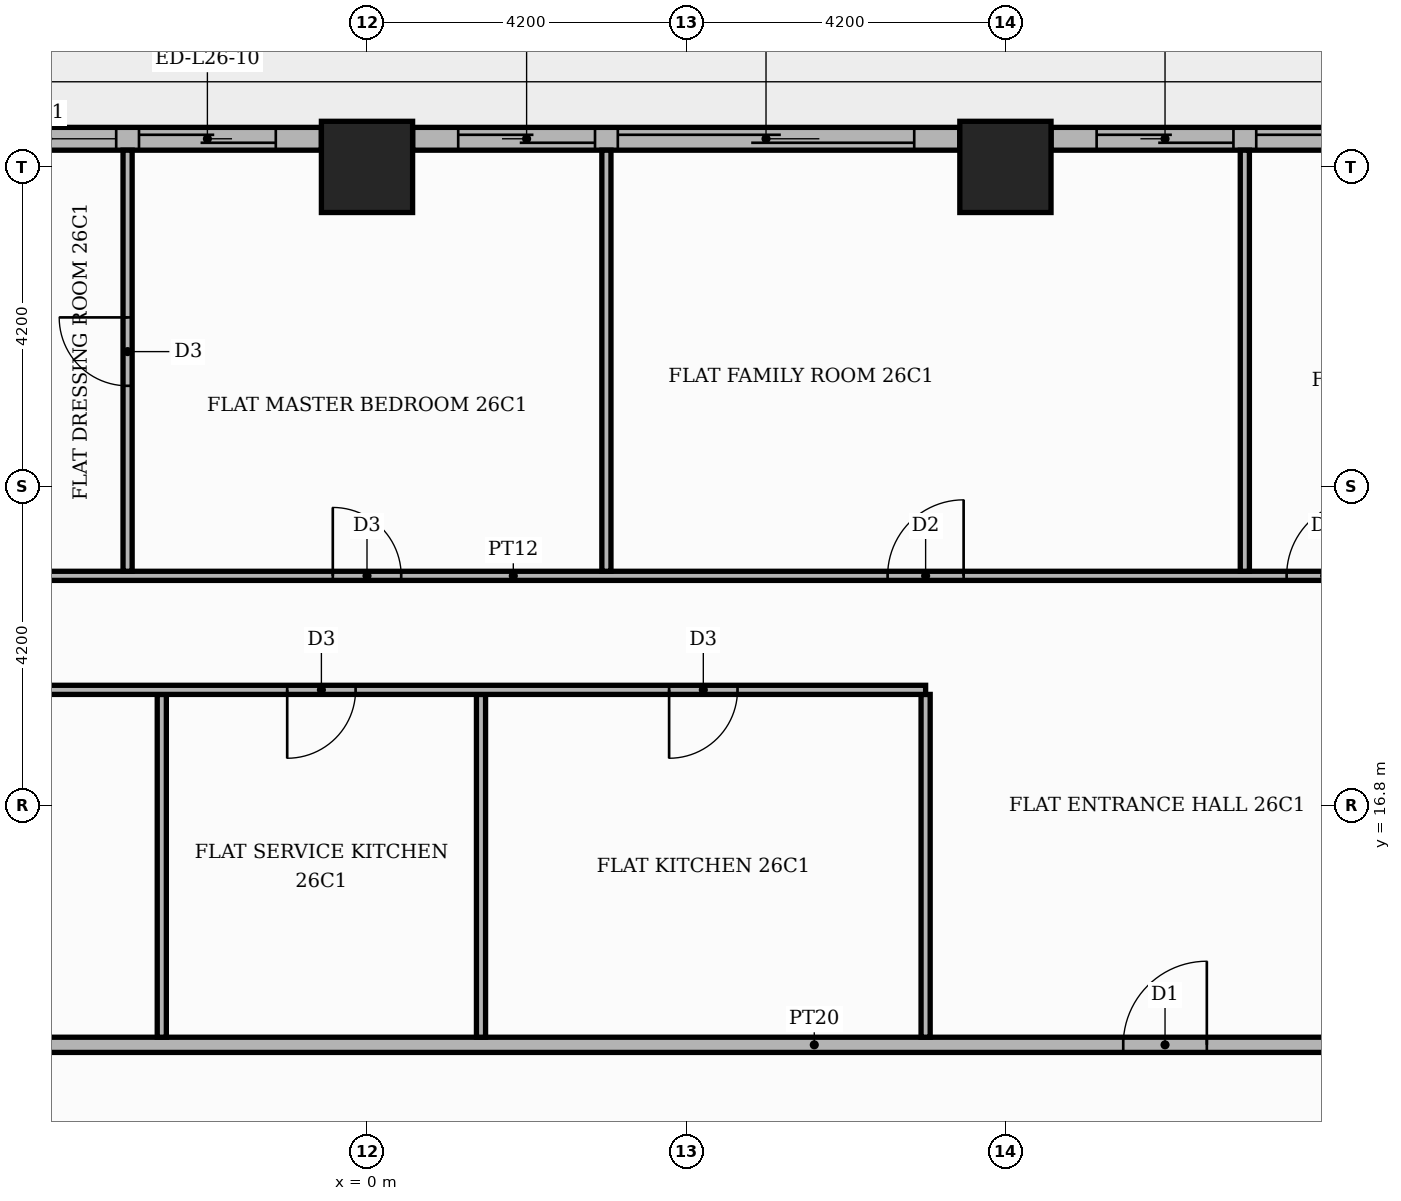
"""IFC4 building model, lengths in metres.
Left out: names, types, materials, properties, quantities, classifications, styles, units other than length and angle.
Written with IfcOpenShell. Run it as: python <this file> out.ifc"""

import sys

from ifc_helpers import new_model, si_unit, direction, frame, frame_2d, origin, origin_2d, place, context, subcontext, project, spatial, rectangle, extrude, element, fill, save


model = new_model("IFC4")
c1 = context("Model", 3, precision=1e-05, world=origin(), true_north=direction((0.0, 1.0)))
c2 = subcontext(c1, "Body", "Model", "MODEL_VIEW")
j1 = project(units=[si_unit("LENGTHUNIT", "METRE"), si_unit("PLANEANGLEUNIT", "RADIAN")], contexts=[c1])
p1 = place(None, origin())
s1 = spatial("IfcSite", under=j1, at=p1, CompositionType="ELEMENT")
p2 = place(p1, origin())
s2 = spatial("IfcBuilding", under=s1, at=p2, CompositionType="ELEMENT")
p3 = place(p2, frame((0.0, 0.0, 110.4)))
s3 = spatial("IfcBuildingStorey", under=s2, at=p3, CompositionType="ELEMENT", Elevation=110.4)
for number, where, z_axis, x_axis in (
    (1, (0.0, 25.2, 0.0), (0.0, 0.0, 1.0), (1.0, 0.0, 0.0)),
    (2, (8.4, 25.2, 0.0), (0.0, 0.0, 1.0), (1.0, 0.0, 0.0)),
):
    element("IfcColumn", number, at=place(p3, frame(where, z_axis=z_axis, x_axis=x_axis)), inside=s3, PredefinedType="COLUMN", context=c2, shape_type="SweptSolid", body=[
        extrude(rectangle(XDim=1.2, YDim=1.2, at=origin_2d()), origin(), (0.0, 0.0, 1.0), 3.9),
    ])
p4 = place(p3, frame((16.2, 25.57, 0.0), z_axis=(0.0, 0.0, 1.0), x_axis=(-1.0, 0.0, 0.0)))
e3 = element("IfcWall", 3, at=p4, inside=s3, PredefinedType="STANDARD", context=c2, shape_type="SweptSolid", body=[
    extrude(rectangle(XDim=7.2, YDim=0.3, at=frame_2d((3.6, 0.0))), origin(), (0.0, 0.0, 1.0), 3.48),
])
p5 = place(p4, frame((0.6, 0.0, 0.0)))
e4 = element("IfcOpeningElement", 4, at=p5, cuts=e3, PredefinedType="OPENING", context=c2, shape_type="SweptSolid", body=[
    extrude(rectangle(XDim=3.9, YDim=2.4, at=frame_2d((1.95, 1.2))), frame((0.0, 0.16, 0.0), z_axis=(0.0, -1.0, 0.0), x_axis=(1.0, 0.0, 0.0)), (0.0, 0.0, 1.0), 0.32),
])
p6 = place(p4, frame((4.8, 0.0, 0.0)))
e5 = element("IfcOpeningElement", 5, at=p6, cuts=e3, PredefinedType="OPENING", context=c2, shape_type="SweptSolid", body=[
    extrude(rectangle(XDim=1.8, YDim=2.4, at=frame_2d((0.9, 1.2))), frame((0.0, 0.16, 0.0), z_axis=(0.0, -1.0, 0.0), x_axis=(1.0, 0.0, 0.0)), (0.0, 0.0, 1.0), 0.32),
])
p7 = place(p3, frame((7.8, 25.57, 0.0), z_axis=(0.0, 0.0, 1.0), x_axis=(-1.0, 0.0, 0.0)))
e6 = element("IfcWall", 6, at=p7, inside=s3, PredefinedType="STANDARD", context=c2, shape_type="SweptSolid", body=[
    extrude(rectangle(XDim=7.2, YDim=0.3, at=frame_2d((3.6, 0.0))), origin(), (0.0, 0.0, 1.0), 3.48),
])
p8 = place(p7, frame((0.6, 0.0, 0.0)))
e7 = element("IfcOpeningElement", 7, at=p8, cuts=e6, PredefinedType="OPENING", context=c2, shape_type="SweptSolid", body=[
    extrude(rectangle(XDim=3.9, YDim=2.4, at=frame_2d((1.95, 1.2))), frame((0.0, 0.16, 0.0), z_axis=(0.0, -1.0, 0.0), x_axis=(1.0, 0.0, 0.0)), (0.0, 0.0, 1.0), 0.32),
])
p9 = place(p7, frame((4.8, 0.0, 0.0)))
e8 = element("IfcOpeningElement", 8, at=p9, cuts=e6, PredefinedType="OPENING", context=c2, shape_type="SweptSolid", body=[
    extrude(rectangle(XDim=1.8, YDim=2.4, at=frame_2d((0.9, 1.2))), frame((0.0, 0.16, 0.0), z_axis=(0.0, -1.0, 0.0), x_axis=(1.0, 0.0, 0.0)), (0.0, 0.0, 1.0), 0.32),
])
p10 = place(p3, frame((-0.6, 25.57, 0.0), z_axis=(0.0, 0.0, 1.0), x_axis=(-1.0, 0.0, 0.0)))
e9 = element("IfcWall", 9, at=p10, inside=s3, PredefinedType="STANDARD", context=c2, shape_type="SweptSolid", body=[
    extrude(rectangle(XDim=7.2, YDim=0.3, at=frame_2d((3.6, 0.0))), origin(), (0.0, 0.0, 1.0), 3.48),
])
p11 = place(p10, frame((0.6, 0.0, 0.0)))
e10 = element("IfcOpeningElement", 10, at=p11, cuts=e9, PredefinedType="OPENING", context=c2, shape_type="SweptSolid", body=[
    extrude(rectangle(XDim=1.8, YDim=2.4, at=frame_2d((0.9, 1.2))), frame((0.0, 0.16, 0.0), z_axis=(0.0, -1.0, 0.0), x_axis=(1.0, 0.0, 0.0)), (0.0, 0.0, 1.0), 0.32),
])
p12 = place(p10, frame((2.7, 0.0, 0.9)))
e11 = element("IfcOpeningElement", 11, at=p12, cuts=e9, PredefinedType="OPENING", context=c2, shape_type="SweptSolid", body=[
    extrude(rectangle(XDim=1.8, YDim=2.1, at=frame_2d((0.9, 1.05))), frame((0.0, 0.16, 0.0), z_axis=(0.0, -1.0, 0.0), x_axis=(1.0, 0.0, 0.0)), (0.0, 0.0, 1.0), 0.32),
])
p13 = place(p10, frame((4.8, 0.0, 0.9)))
e12 = element("IfcOpeningElement", 12, at=p13, cuts=e9, PredefinedType="OPENING", context=c2, shape_type="SweptSolid", body=[
    extrude(rectangle(XDim=1.8, YDim=2.1, at=frame_2d((0.9, 1.05))), frame((0.0, 0.16, 0.0), z_axis=(0.0, -1.0, 0.0), x_axis=(1.0, 0.0, 0.0)), (0.0, 0.0, 1.0), 0.32),
])
p14 = place(p3, frame((-13.65, 13.65, 0.0), z_axis=(0.0, 0.0, 1.0), x_axis=(1.0, 0.0, 0.0)))
e13 = element("IfcWall", 13, at=p14, inside=s3, PredefinedType="PARTITIONING", context=c2, shape_type="SweptSolid", body=[
    extrude(rectangle(XDim=39.07, YDim=0.2, at=frame_2d((19.535, 0.0))), origin(), (0.0, 0.0, 1.0), 3.48),
])
p15 = place(p14, frame((23.6, 0.0, 0.0)))
e14 = element("IfcOpeningElement", 14, at=p15, cuts=e13, PredefinedType="OPENING", context=c2, shape_type="SweptSolid", body=[
    extrude(rectangle(XDim=1.1, YDim=2.4, at=frame_2d((0.55, 1.2))), frame((0.0, 0.11, 0.0), z_axis=(0.0, -1.0, 0.0), x_axis=(1.0, 0.0, 0.0)), (0.0, 0.0, 1.0), 0.22),
])
for number, where, z_axis, x_axis in (
    (15, (-2.7, 13.75, 0.0), (0.0, 0.0, 1.0), (0.0, 1.0, 0.0)),
    (16, (1.5, 13.75, 0.0), (0.0, 0.0, 1.0), (0.0, 1.0, 0.0)),
    (17, (7.35, 13.75, 0.0), (0.0, 0.0, 1.0), (0.0, 1.0, 0.0)),
):
    element("IfcWall", number, at=place(p3, frame(where, z_axis=z_axis, x_axis=x_axis)), inside=s3, PredefinedType="PARTITIONING", context=c2, shape_type="SweptSolid", body=[
        extrude(rectangle(XDim=4.51, YDim=0.12, at=frame_2d((2.255, 0.0))), origin(), (0.0, 0.0, 1.0), 3.48),
    ])
p16 = place(p3, frame((-13.55, 18.32, 0.0), z_axis=(0.0, 0.0, 1.0), x_axis=(1.0, 0.0, 0.0)))
e18 = element("IfcWall", 18, at=p16, inside=s3, PredefinedType="PARTITIONING", context=c2, shape_type="SweptSolid", body=[
    extrude(rectangle(XDim=20.9, YDim=0.12, at=frame_2d((10.45, 0.0))), origin(), (0.0, 0.0, 1.0), 3.48),
])
p17 = place(p16, frame((17.525, 0.0, 0.0)))
e19 = element("IfcOpeningElement", 19, at=p17, cuts=e18, PredefinedType="OPENING", context=c2, shape_type="SweptSolid", body=[
    extrude(rectangle(XDim=0.9, YDim=2.1, at=frame_2d((0.45, 1.05))), frame((0.0, 0.07, 0.0), z_axis=(0.0, -1.0, 0.0), x_axis=(1.0, 0.0, 0.0)), (0.0, 0.0, 1.0), 0.14),
])
p18 = place(p16, frame((12.5, 0.0, 0.0)))
e20 = element("IfcOpeningElement", 20, at=p18, cuts=e18, PredefinedType="OPENING", context=c2, shape_type="SweptSolid", body=[
    extrude(rectangle(XDim=0.9, YDim=2.1, at=frame_2d((0.45, 1.05))), frame((0.0, 0.07, 0.0), z_axis=(0.0, -1.0, 0.0), x_axis=(1.0, 0.0, 0.0)), (0.0, 0.0, 1.0), 0.14),
])
p19 = place(p16, frame((7.025, 0.0, 0.0)))
e21 = element("IfcOpeningElement", 21, at=p19, cuts=e18, PredefinedType="OPENING", context=c2, shape_type="SweptSolid", body=[
    extrude(rectangle(XDim=0.9, YDim=2.1, at=frame_2d((0.45, 1.05))), frame((0.0, 0.07, 0.0), z_axis=(0.0, -1.0, 0.0), x_axis=(1.0, 0.0, 0.0)), (0.0, 0.0, 1.0), 0.14),
])
p20 = place(p16, frame((2.75, 0.0, 0.0)))
e22 = element("IfcOpeningElement", 22, at=p20, cuts=e18, PredefinedType="OPENING", context=c2, shape_type="SweptSolid", body=[
    extrude(rectangle(XDim=0.9, YDim=2.1, at=frame_2d((0.45, 1.05))), frame((0.0, 0.07, 0.0), z_axis=(0.0, -1.0, 0.0), x_axis=(1.0, 0.0, 0.0)), (0.0, 0.0, 1.0), 0.14),
])
p21 = place(p16, frame((0.65, 0.0, 0.0)))
e23 = element("IfcOpeningElement", 23, at=p21, cuts=e18, PredefinedType="OPENING", context=c2, shape_type="SweptSolid", body=[
    extrude(rectangle(XDim=0.9, YDim=2.1, at=frame_2d((0.45, 1.05))), frame((0.0, 0.07, 0.0), z_axis=(0.0, -1.0, 0.0), x_axis=(1.0, 0.0, 0.0)), (0.0, 0.0, 1.0), 0.14),
])
p22 = place(p3, frame((-13.55, 19.82, 0.0), z_axis=(0.0, 0.0, 1.0), x_axis=(1.0, 0.0, 0.0)))
e24 = element("IfcWall", 24, at=p22, inside=s3, PredefinedType="PARTITIONING", context=c2, shape_type="SweptSolid", body=[
    extrude(rectangle(XDim=30.95, YDim=0.12, at=frame_2d((15.475, 0.0))), origin(), (0.0, 0.0, 1.0), 3.48),
])
p23 = place(p22, frame((25.65, 0.0, 0.0)))
e25 = element("IfcOpeningElement", 25, at=p23, cuts=e24, PredefinedType="OPENING", context=c2, shape_type="SweptSolid", body=[
    extrude(rectangle(XDim=1.0, YDim=2.1, at=frame_2d((0.5, 1.05))), frame((0.0, 0.07, 0.0), z_axis=(0.0, -1.0, 0.0), x_axis=(1.0, 0.0, 0.0)), (0.0, 0.0, 1.0), 0.14),
])
p24 = place(p22, frame((20.4, 0.0, 0.0)))
e26 = element("IfcOpeningElement", 26, at=p24, cuts=e24, PredefinedType="OPENING", context=c2, shape_type="SweptSolid", body=[
    extrude(rectangle(XDim=1.0, YDim=2.1, at=frame_2d((0.5, 1.05))), frame((0.0, 0.07, 0.0), z_axis=(0.0, -1.0, 0.0), x_axis=(1.0, 0.0, 0.0)), (0.0, 0.0, 1.0), 0.14),
])
p25 = place(p22, frame((13.1, 0.0, 0.0)))
e27 = element("IfcOpeningElement", 27, at=p25, cuts=e24, PredefinedType="OPENING", context=c2, shape_type="SweptSolid", body=[
    extrude(rectangle(XDim=0.9, YDim=2.1, at=frame_2d((0.45, 1.05))), frame((0.0, 0.07, 0.0), z_axis=(0.0, -1.0, 0.0), x_axis=(1.0, 0.0, 0.0)), (0.0, 0.0, 1.0), 0.14),
])
p26 = place(p22, frame((3.65, 0.0, 0.0)))
e28 = element("IfcOpeningElement", 28, at=p26, cuts=e24, PredefinedType="OPENING", context=c2, shape_type="SweptSolid", body=[
    extrude(rectangle(XDim=0.9, YDim=2.1, at=frame_2d((0.45, 1.05))), frame((0.0, 0.07, 0.0), z_axis=(0.0, -1.0, 0.0), x_axis=(1.0, 0.0, 0.0)), (0.0, 0.0, 1.0), 0.14),
])
p27 = place(p3, frame((-3.15, 19.88, 0.0), z_axis=(0.0, 0.0, 1.0), x_axis=(0.0, 1.0, 0.0)))
e29 = element("IfcWall", 29, at=p27, inside=s3, PredefinedType="PARTITIONING", context=c2, shape_type="SweptSolid", body=[
    extrude(rectangle(XDim=5.54, YDim=0.12, at=frame_2d((2.77, 0.0))), origin(), (0.0, 0.0, 1.0), 3.48),
])
p28 = place(p27, frame((2.44, 0.0, 0.0)))
e30 = element("IfcOpeningElement", 30, at=p28, cuts=e29, PredefinedType="OPENING", context=c2, shape_type="SweptSolid", body=[
    extrude(rectangle(XDim=0.9, YDim=2.1, at=frame_2d((0.45, 1.05))), frame((0.0, 0.07, 0.0), z_axis=(0.0, -1.0, 0.0), x_axis=(1.0, 0.0, 0.0)), (0.0, 0.0, 1.0), 0.14),
])
for number, where, z_axis, x_axis in (
    (31, (3.15, 19.88, 0.0), (0.0, 0.0, 1.0), (0.0, 1.0, 0.0)),
    (32, (11.55, 19.88, 0.0), (0.0, 0.0, 1.0), (0.0, 1.0, 0.0)),
):
    element("IfcWall", number, at=place(p3, frame(where, z_axis=z_axis, x_axis=x_axis)), inside=s3, PredefinedType="PARTITIONING", context=c2, shape_type="SweptSolid", body=[
        extrude(rectangle(XDim=5.54, YDim=0.12, at=frame_2d((2.77, 0.0))), origin(), (0.0, 0.0, 1.0), 3.48),
    ])
p29 = place(p5, origin())
e33 = element("IfcDoor", 33, at=p29, inside=s3, OperationType="SLIDING_TO_LEFT", PredefinedType="DOOR", context=c2, shape_type="SweptSolid", body=[
    extrude(rectangle(XDim=3.9, YDim=2.4, at=frame_2d((1.95, 1.2))), frame((0.0, 0.025, 0.0), z_axis=(0.0, -1.0, 0.0), x_axis=(1.0, 0.0, 0.0)), (0.0, 0.0, 1.0), 0.05),
])
fill(e4, e33)
p30 = place(p6, origin())
e34 = element("IfcDoor", 34, at=p30, inside=s3, OperationType="SLIDING_TO_RIGHT", PredefinedType="DOOR", context=c2, shape_type="SweptSolid", body=[
    extrude(rectangle(XDim=1.8, YDim=2.4, at=frame_2d((0.9, 1.2))), frame((0.0, 0.025, 0.0), z_axis=(0.0, -1.0, 0.0), x_axis=(1.0, 0.0, 0.0)), (0.0, 0.0, 1.0), 0.05),
])
fill(e5, e34)
p31 = place(p8, origin())
e35 = element("IfcDoor", 35, at=p31, inside=s3, OperationType="SLIDING_TO_LEFT", PredefinedType="DOOR", context=c2, shape_type="SweptSolid", body=[
    extrude(rectangle(XDim=3.9, YDim=2.4, at=frame_2d((1.95, 1.2))), frame((0.0, 0.025, 0.0), z_axis=(0.0, -1.0, 0.0), x_axis=(1.0, 0.0, 0.0)), (0.0, 0.0, 1.0), 0.05),
])
fill(e7, e35)
p32 = place(p9, origin())
e36 = element("IfcDoor", 36, at=p32, inside=s3, OperationType="SLIDING_TO_RIGHT", PredefinedType="DOOR", context=c2, shape_type="SweptSolid", body=[
    extrude(rectangle(XDim=1.8, YDim=2.4, at=frame_2d((0.9, 1.2))), frame((0.0, 0.025, 0.0), z_axis=(0.0, -1.0, 0.0), x_axis=(1.0, 0.0, 0.0)), (0.0, 0.0, 1.0), 0.05),
])
fill(e8, e36)
p33 = place(p11, origin())
e37 = element("IfcDoor", 37, at=p33, inside=s3, OperationType="SLIDING_TO_LEFT", PredefinedType="DOOR", context=c2, shape_type="SweptSolid", body=[
    extrude(rectangle(XDim=1.8, YDim=2.4, at=frame_2d((0.9, 1.2))), frame((0.0, 0.025, 0.0), z_axis=(0.0, -1.0, 0.0), x_axis=(1.0, 0.0, 0.0)), (0.0, 0.0, 1.0), 0.05),
])
fill(e10, e37)
p34 = place(p12, origin())
e38 = element("IfcWindow", 38, at=p34, inside=s3, PartitioningType="SINGLE_PANEL", PredefinedType="WINDOW", context=c2, shape_type="SweptSolid", body=[
    extrude(rectangle(XDim=1.8, YDim=2.1, at=frame_2d((0.9, 1.05))), frame((0.0, 0.03, 0.0), z_axis=(0.0, -1.0, 0.0), x_axis=(1.0, 0.0, 0.0)), (0.0, 0.0, 1.0), 0.06),
])
fill(e11, e38)
p35 = place(p15, origin())
e39 = element("IfcDoor", 39, at=p35, inside=s3, OperationType="SINGLE_SWING_RIGHT", PredefinedType="DOOR", context=c2, shape_type="SweptSolid", body=[
    extrude(rectangle(XDim=1.1, YDim=2.4, at=frame_2d((0.55, 1.2))), frame((0.0, 0.025, 0.0), z_axis=(0.0, -1.0, 0.0), x_axis=(1.0, 0.0, 0.0)), (0.0, 0.0, 1.0), 0.05),
])
fill(e14, e39)
p36 = place(p17, frame((0.9, 0.0, 0.0), z_axis=(0.0, 0.0, 1.0), x_axis=(-1.0, 0.0, 0.0)))
e40 = element("IfcDoor", 40, at=p36, inside=s3, OperationType="SINGLE_SWING_LEFT", PredefinedType="DOOR", context=c2, shape_type="SweptSolid", body=[
    extrude(rectangle(XDim=0.9, YDim=2.1, at=frame_2d((0.45, 1.05))), frame((0.0, 0.025, 0.0), z_axis=(0.0, -1.0, 0.0), x_axis=(1.0, 0.0, 0.0)), (0.0, 0.0, 1.0), 0.05),
])
fill(e19, e40)
p37 = place(p18, frame((0.9, 0.0, 0.0), z_axis=(0.0, 0.0, 1.0), x_axis=(-1.0, 0.0, 0.0)))
e41 = element("IfcDoor", 41, at=p37, inside=s3, OperationType="SINGLE_SWING_LEFT", PredefinedType="DOOR", context=c2, shape_type="SweptSolid", body=[
    extrude(rectangle(XDim=0.9, YDim=2.1, at=frame_2d((0.45, 1.05))), frame((0.0, 0.025, 0.0), z_axis=(0.0, -1.0, 0.0), x_axis=(1.0, 0.0, 0.0)), (0.0, 0.0, 1.0), 0.05),
])
fill(e20, e41)
p38 = place(p23, origin())
e42 = element("IfcDoor", 42, at=p38, inside=s3, OperationType="SINGLE_SWING_RIGHT", PredefinedType="DOOR", context=c2, shape_type="SweptSolid", body=[
    extrude(rectangle(XDim=1.0, YDim=2.1, at=frame_2d((0.5, 1.05))), frame((0.0, 0.025, 0.0), z_axis=(0.0, -1.0, 0.0), x_axis=(1.0, 0.0, 0.0)), (0.0, 0.0, 1.0), 0.05),
])
fill(e25, e42)
p39 = place(p24, origin())
e43 = element("IfcDoor", 43, at=p39, inside=s3, OperationType="SINGLE_SWING_RIGHT", PredefinedType="DOOR", context=c2, shape_type="SweptSolid", body=[
    extrude(rectangle(XDim=1.0, YDim=2.1, at=frame_2d((0.5, 1.05))), frame((0.0, 0.025, 0.0), z_axis=(0.0, -1.0, 0.0), x_axis=(1.0, 0.0, 0.0)), (0.0, 0.0, 1.0), 0.05),
])
fill(e26, e43)
p40 = place(p25, origin())
e44 = element("IfcDoor", 44, at=p40, inside=s3, OperationType="SINGLE_SWING_LEFT", PredefinedType="DOOR", context=c2, shape_type="SweptSolid", body=[
    extrude(rectangle(XDim=0.9, YDim=2.1, at=frame_2d((0.45, 1.05))), frame((0.0, 0.025, 0.0), z_axis=(0.0, -1.0, 0.0), x_axis=(1.0, 0.0, 0.0)), (0.0, 0.0, 1.0), 0.05),
])
fill(e27, e44)
p41 = place(p28, origin())
e45 = element("IfcDoor", 45, at=p41, inside=s3, OperationType="SINGLE_SWING_RIGHT", PredefinedType="DOOR", context=c2, shape_type="SweptSolid", body=[
    extrude(rectangle(XDim=0.9, YDim=2.1, at=frame_2d((0.45, 1.05))), frame((0.0, 0.025, 0.0), z_axis=(0.0, -1.0, 0.0), x_axis=(1.0, 0.0, 0.0)), (0.0, 0.0, 1.0), 0.05),
])
fill(e30, e45)
save(model, sys.argv[1])
